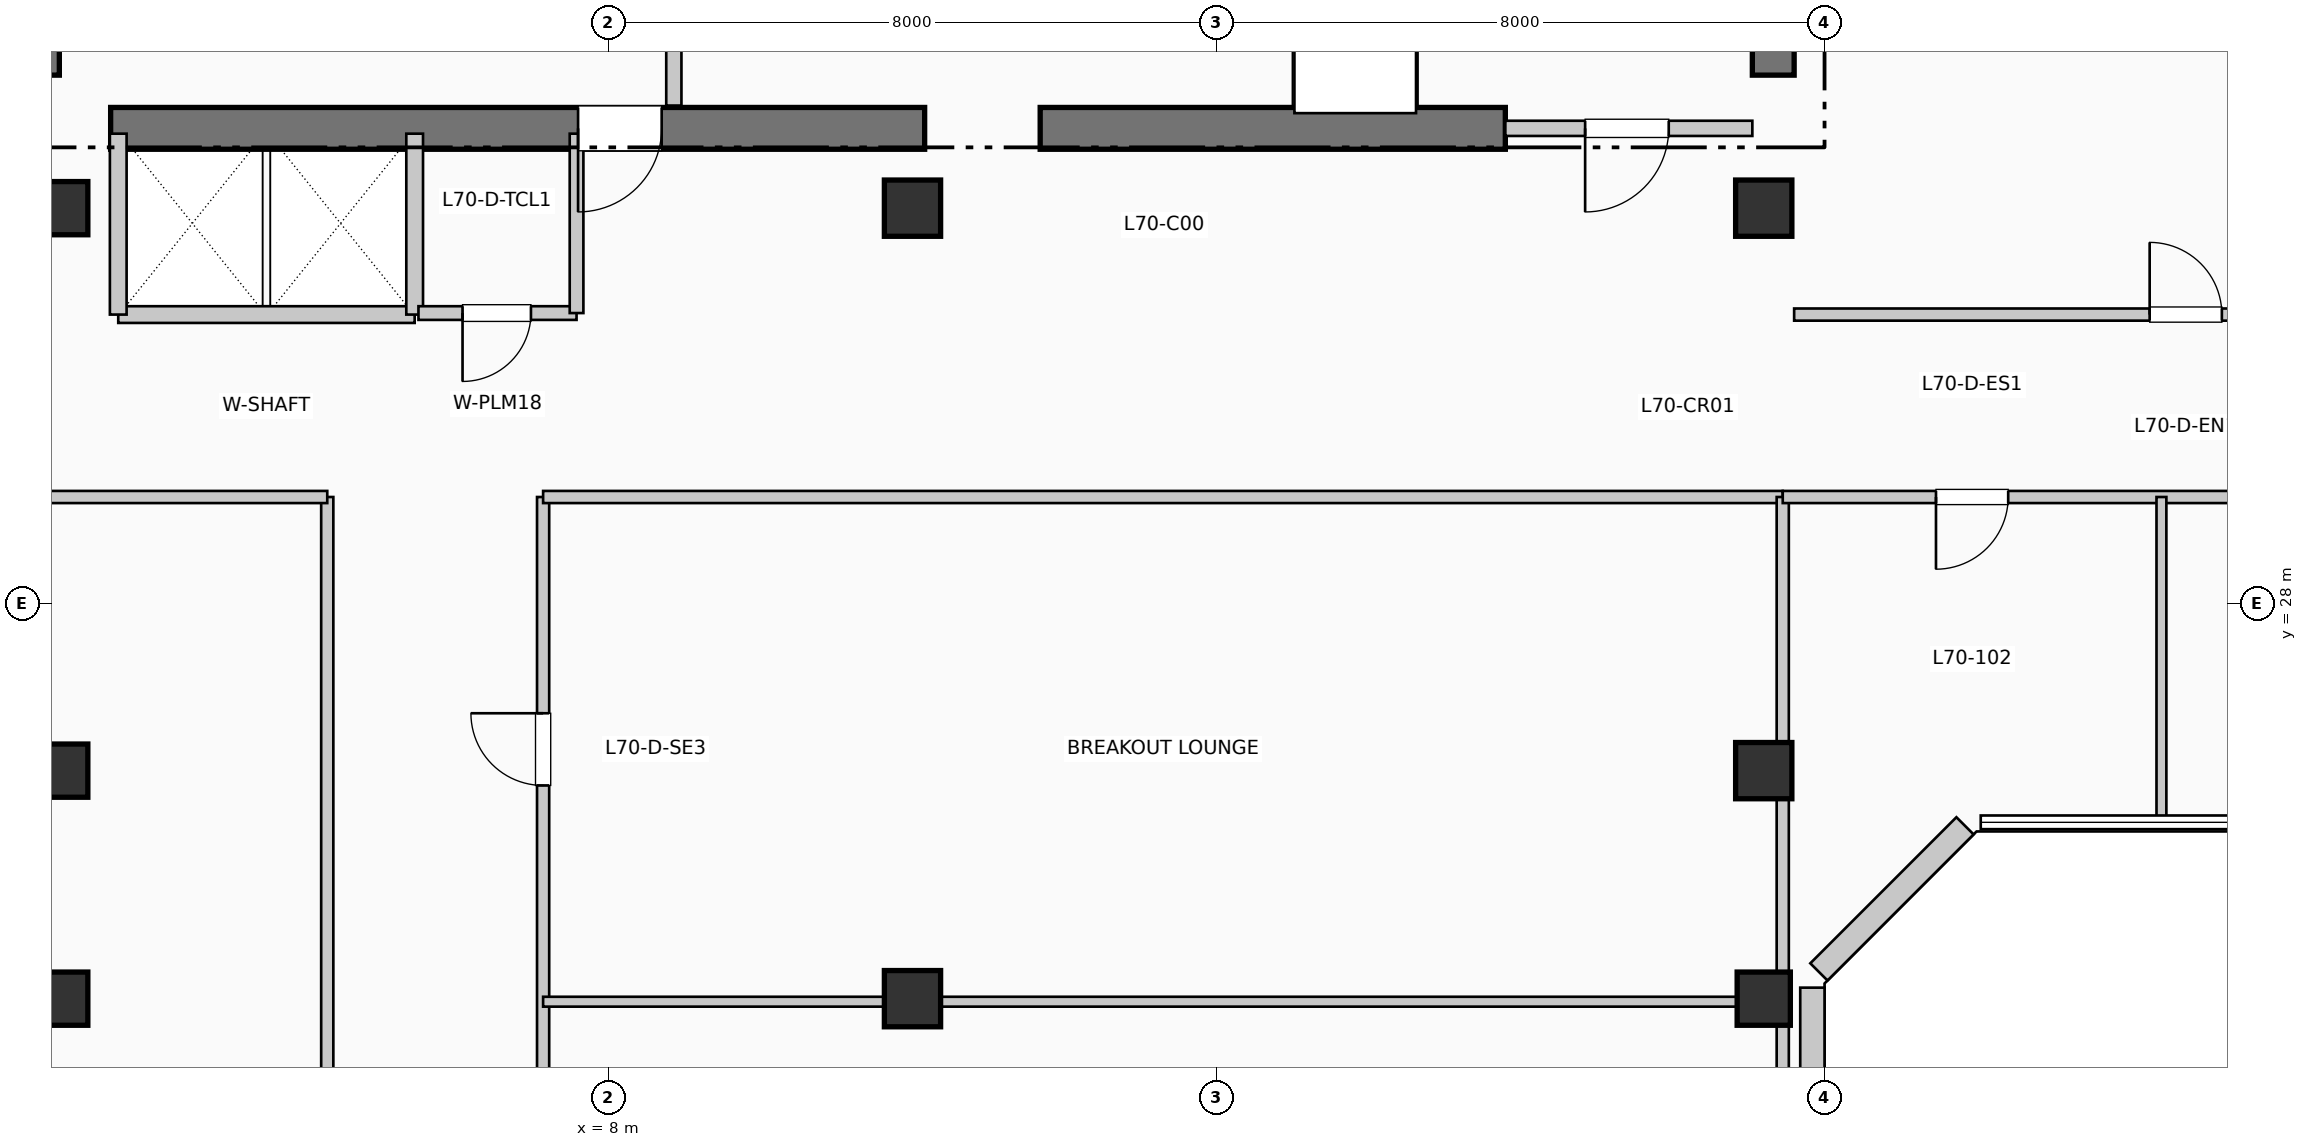
"""IFC4 building model, lengths in metres.
Left out: names, types, materials, properties, quantities, classifications, styles, units other than length and angle.
Written with IfcOpenShell. Run it as: python <this file> out.ifc"""

import sys

from ifc_helpers import new_model, si_unit, direction, frame, frame_2d, origin, origin_2d, place, context, subcontext, project, spatial, rectangle, extrude, element, fill, save


model = new_model("IFC4")
c1 = context("Model", 3, precision=1e-05, world=origin(), true_north=direction((0.0, 1.0)))
c2 = subcontext(c1, "Body", "Model", "MODEL_VIEW")
j1 = project(units=[si_unit("LENGTHUNIT", "METRE"), si_unit("PLANEANGLEUNIT", "RADIAN")], contexts=[c1])
p1 = place(None, origin())
s1 = spatial("IfcSite", under=j1, at=p1, CompositionType="ELEMENT")
p2 = place(p1, origin())
s2 = spatial("IfcBuilding", under=s1, at=p2, CompositionType="ELEMENT")
p3 = place(p2, frame((0.0, 0.0, 288.09)))
s3 = spatial("IfcBuildingStorey", under=s2, at=p3, CompositionType="ELEMENT", Elevation=288.09)
p4 = place(p3, frame((0.5, 34.95, 0.0), z_axis=(0.0, 0.0, 1.0), x_axis=(0.0, 1.0, 0.0)))
e1 = element("IfcWall", 1, at=p4, inside=s3, PredefinedType="SHEAR", context=c2, shape_type="SweptSolid", body=[
    extrude(rectangle(XDim=7.9, YDim=0.55, at=frame_2d((3.95, 0.0))), origin(), (0.0, 0.0, 1.0), 3.96),
])
p5 = place(p3, frame((23.325, 34.95, 0.0), z_axis=(0.0, 0.0, 1.0), x_axis=(0.0, 1.0, 0.0)))
e2 = element("IfcWall", 2, at=p5, inside=s3, PredefinedType="SHEAR", context=c2, shape_type="SweptSolid", body=[
    extrude(rectangle(XDim=10.64, YDim=0.55, at=frame_2d((5.32, 0.0))), origin(), (0.0, 0.0, 1.0), 3.96),
])
p6 = place(p3, frame((1.45, 34.25, 0.0), z_axis=(0.0, 0.0, 1.0), x_axis=(1.0, 0.0, 0.0)))
e3 = element("IfcWall", 3, at=p6, inside=s3, PredefinedType="SHEAR", context=c2, shape_type="SweptSolid", body=[
    extrude(rectangle(XDim=10.71, YDim=0.55, at=frame_2d((5.355, 0.0))), origin(), (0.0, 0.0, 1.0), 3.96),
])
p7 = place(p6, frame((7.25, 0.0, 0.0), z_axis=(0.0, 0.0, 1.0), x_axis=(-1.0, 0.0, 0.0)))
e4 = element("IfcOpeningElement", 4, at=p7, cuts=e3, PredefinedType="OPENING", context=c2, shape_type="SweptSolid", body=[
    extrude(rectangle(XDim=1.1, YDim=2.15, at=frame_2d((0.55, 1.075))), frame((0.0, 0.285, 0.0), z_axis=(0.0, -1.0, 0.0), x_axis=(1.0, 0.0, 0.0)), (0.0, 0.0, 1.0), 0.57),
])
p8 = place(p3, frame((13.68, 34.25, 0.0), z_axis=(0.0, 0.0, 1.0), x_axis=(1.0, 0.0, 0.0)))
e5 = element("IfcWall", 5, at=p8, inside=s3, PredefinedType="SHEAR", context=c2, shape_type="SweptSolid", body=[
    extrude(rectangle(XDim=6.12, YDim=0.55, at=frame_2d((3.06, 0.0))), origin(), (0.0, 0.0, 1.0), 3.96),
])
for number, where, z_axis, x_axis in (
    (6, (0.8, 22.8, 0.0), (0.0, 0.0, 1.0), (1.0, 0.0, 0.0)),
    (7, (0.8, 25.8, 0.0), (0.0, 0.0, 1.0), (1.0, 0.0, 0.0)),
    (8, (0.8, 33.2, 0.0), (0.0, 0.0, 1.0), (1.0, 0.0, 0.0)),
):
    element("IfcColumn", number, at=place(p3, frame(where, z_axis=z_axis, x_axis=x_axis)), inside=s3, PredefinedType="COLUMN", context=c2, shape_type="SweptSolid", body=[
        extrude(rectangle(XDim=0.7, YDim=0.7, at=origin_2d()), origin(), (0.0, 0.0, 1.0), 3.96),
    ])
for number, where, z_axis, x_axis in (
    (9, (12.0, 22.8, 0.0), (0.0, 0.0, 1.0), (1.0, 0.0, 0.0)),
    (10, (12.0, 33.2, 0.0), (0.0, 0.0, 1.0), (1.0, 0.0, 0.0)),
):
    element("IfcColumn", number, at=place(p3, frame(where, z_axis=z_axis, x_axis=x_axis)), inside=s3, PredefinedType="COLUMN", context=c2, shape_type="SweptSolid", body=[
        extrude(rectangle(XDim=0.74, YDim=0.74, at=origin_2d()), origin(), (0.0, 0.0, 1.0), 3.96),
    ])
p9 = place(p3, frame((23.2, 22.8, 0.0), z_axis=(0.0, 0.0, 1.0), x_axis=(1.0, 0.0, 0.0)))
e11 = element("IfcColumn", 11, at=p9, inside=s3, PredefinedType="COLUMN", context=c2, shape_type="SweptSolid", body=[
    extrude(rectangle(XDim=0.7, YDim=0.7, at=origin_2d()), origin(), (0.0, 0.0, 1.0), 3.96),
])
for number, where, z_axis, x_axis in (
    (12, (23.2, 25.8, 0.0), (0.0, 0.0, 1.0), (1.0, 0.0, 0.0)),
    (13, (23.2, 33.2, 0.0), (0.0, 0.0, 1.0), (1.0, 0.0, 0.0)),
):
    element("IfcColumn", number, at=place(p3, frame(where, z_axis=z_axis, x_axis=x_axis)), inside=s3, PredefinedType="COLUMN", context=c2, shape_type="SweptSolid", body=[
        extrude(rectangle(XDim=0.74, YDim=0.74, at=origin_2d()), origin(), (0.0, 0.0, 1.0), 3.96),
    ])
p10 = place(p3, frame((23.84, 8.855, 0.0), z_axis=(0.0, 0.0, 1.0), x_axis=(0.0, 1.0, 0.0)))
e14 = element("IfcWall", 14, at=p10, inside=s3, PredefinedType="SOLIDWALL", context=c2, shape_type="SweptSolid", body=[
    extrude(rectangle(XDim=14.09, YDim=0.32, at=frame_2d((7.045, 0.0))), origin(), (0.0, 0.0, 1.0), 3.74),
])
p11 = place(p3, frame((23.926, 23.152, 0.0), z_axis=(0.0, 0.0, 1.0), x_axis=(0.707106781187, 0.707106781187, 0.0)))
e15 = element("IfcWall", 15, at=p11, inside=s3, PredefinedType="SOLIDWALL", context=c2, shape_type="SweptSolid", body=[
    extrude(rectangle(XDim=2.718, YDim=0.32, at=frame_2d((1.359, 0.0))), origin(), (0.0, 0.0, 1.0), 3.74),
])
p12 = place(p3, frame((8.86, 34.55, 0.0), z_axis=(0.0, 0.0, 1.0), x_axis=(0.0, 1.0, 0.0)))
e16 = element("IfcWall", 16, at=p12, inside=s3, PredefinedType="PARTITIONING", context=c2, shape_type="SweptSolid", body=[
    extrude(rectangle(XDim=2.5, YDim=0.2, at=frame_2d((1.25, 0.0))), origin(), (0.0, 0.0, 1.0), 3.74),
])
p13 = place(p3, frame((19.8, 34.25, 0.0), z_axis=(0.0, 0.0, 1.0), x_axis=(1.0, 0.0, 0.0)))
e17 = element("IfcWall", 17, at=p13, inside=s3, PredefinedType="PARTITIONING", context=c2, shape_type="SweptSolid", body=[
    extrude(rectangle(XDim=3.25, YDim=0.2, at=frame_2d((1.625, 0.0))), origin(), (0.0, 0.0, 1.0), 3.74),
])
p14 = place(p13, frame((2.15, 0.0, 0.0), z_axis=(0.0, 0.0, 1.0), x_axis=(-1.0, 0.0, 0.0)))
e18 = element("IfcOpeningElement", 18, at=p14, cuts=e17, PredefinedType="OPENING", context=c2, shape_type="SweptSolid", body=[
    extrude(rectangle(XDim=1.1, YDim=2.15, at=frame_2d((0.55, 1.075))), frame((0.0, 0.11, 0.0), z_axis=(0.0, -1.0, 0.0), x_axis=(1.0, 0.0, 0.0)), (0.0, 0.0, 1.0), 0.22),
])
p15 = place(p3, frame((1.55, 31.8, 0.0), z_axis=(0.0, 0.0, 1.0), x_axis=(1.0, 0.0, 0.0)))
e19 = element("IfcWall", 19, at=p15, inside=s3, PredefinedType="PARTITIONING", context=c2, shape_type="SweptSolid", body=[
    extrude(rectangle(XDim=3.9, YDim=0.22, at=frame_2d((1.95, 0.0))), origin(), (0.0, 0.0, 1.0), 3.74),
])
for number, where, z_axis, x_axis in (
    (20, (1.55, 31.8, 0.0), (0.0, 0.0, 1.0), (0.0, 1.0, 0.0)),
    (21, (5.45, 31.8, 0.0), (0.0, 0.0, 1.0), (0.0, 1.0, 0.0)),
):
    element("IfcWall", number, at=place(p3, frame(where, z_axis=z_axis, x_axis=x_axis)), inside=s3, PredefinedType="PARTITIONING", context=c2, shape_type="SweptSolid", body=[
        extrude(rectangle(XDim=2.38, YDim=0.22, at=frame_2d((1.19, 0.0))), origin(), (0.0, 0.0, 1.0), 3.74),
    ])
p16 = place(p3, frame((5.5, 31.82, 0.0), z_axis=(0.0, 0.0, 1.0), x_axis=(1.0, 0.0, 0.0)))
e22 = element("IfcWall", 22, at=p16, inside=s3, PredefinedType="PLUMBINGWALL", context=c2, shape_type="SweptSolid", body=[
    extrude(rectangle(XDim=2.08, YDim=0.18, at=frame_2d((1.04, 0.0))), origin(), (0.0, 0.0, 1.0), 3.74),
])
p17 = place(p16, frame((1.48, 0.0, 0.0), z_axis=(0.0, 0.0, 1.0), x_axis=(-1.0, 0.0, 0.0)))
e23 = element("IfcOpeningElement", 23, at=p17, cuts=e22, PredefinedType="OPENING", context=c2, shape_type="SweptSolid", body=[
    extrude(rectangle(XDim=0.9, YDim=2.1, at=frame_2d((0.45, 1.05))), frame((0.0, 0.1, 0.0), z_axis=(0.0, -1.0, 0.0), x_axis=(1.0, 0.0, 0.0)), (0.0, 0.0, 1.0), 0.2),
])
p18 = place(p3, frame((7.58, 31.82, 0.0), z_axis=(0.0, 0.0, 1.0), x_axis=(0.0, 1.0, 0.0)))
e24 = element("IfcWall", 24, at=p18, inside=s3, PredefinedType="PLUMBINGWALL", context=c2, shape_type="SweptSolid", body=[
    extrude(rectangle(XDim=2.36, YDim=0.18, at=frame_2d((1.18, 0.0))), origin(), (0.0, 0.0, 1.0), 3.74),
])
p19 = place(p3, frame((4.3, 12.8, 0.0), z_axis=(0.0, 0.0, 1.0), x_axis=(0.0, 1.0, 0.0)))
e25 = element("IfcWall", 25, at=p19, inside=s3, PredefinedType="PARTITIONING", context=c2, shape_type="SweptSolid", body=[
    extrude(rectangle(XDim=16.6, YDim=0.16, at=frame_2d((8.3, 0.0))), origin(), (0.0, 0.0, 1.0), 3.74),
])
p20 = place(p19, frame((8.775, 0.0, 0.0), z_axis=(0.0, 0.0, 1.0), x_axis=(-1.0, 0.0, 0.0)))
e26 = element("IfcOpeningElement", 26, at=p20, cuts=e25, PredefinedType="OPENING", context=c2, shape_type="SweptSolid", body=[
    extrude(rectangle(XDim=0.95, YDim=2.15, at=frame_2d((0.475, 1.075))), frame((0.0, 0.09, 0.0), z_axis=(0.0, -1.0, 0.0), x_axis=(1.0, 0.0, 0.0)), (0.0, 0.0, 1.0), 0.18),
])
p21 = place(p3, frame((7.14, 12.8, 0.0), z_axis=(0.0, 0.0, 1.0), x_axis=(0.0, 1.0, 0.0)))
e27 = element("IfcWall", 27, at=p21, inside=s3, PredefinedType="PARTITIONING", context=c2, shape_type="SweptSolid", body=[
    extrude(rectangle(XDim=16.6, YDim=0.16, at=frame_2d((8.3, 0.0))), origin(), (0.0, 0.0, 1.0), 3.74),
])
p22 = place(p21, frame((1.849, 0.0, 0.0)))
e28 = element("IfcOpeningElement", 28, at=p22, cuts=e27, PredefinedType="OPENING", context=c2, shape_type="SweptSolid", body=[
    extrude(rectangle(XDim=0.95, YDim=2.15, at=frame_2d((0.475, 1.075))), frame((0.0, 0.09, 0.0), z_axis=(0.0, -1.0, 0.0), x_axis=(1.0, 0.0, 0.0)), (0.0, 0.0, 1.0), 0.18),
])
p23 = place(p21, frame((6.829, 0.0, 0.0)))
e29 = element("IfcOpeningElement", 29, at=p23, cuts=e27, PredefinedType="OPENING", context=c2, shape_type="SweptSolid", body=[
    extrude(rectangle(XDim=0.95, YDim=2.15, at=frame_2d((0.475, 1.075))), frame((0.0, 0.09, 0.0), z_axis=(0.0, -1.0, 0.0), x_axis=(1.0, 0.0, 0.0)), (0.0, 0.0, 1.0), 0.18),
])
p24 = place(p21, frame((12.805, 0.0, 0.0)))
e30 = element("IfcOpeningElement", 30, at=p24, cuts=e27, PredefinedType="OPENING", context=c2, shape_type="SweptSolid", body=[
    extrude(rectangle(XDim=0.95, YDim=2.15, at=frame_2d((0.475, 1.075))), frame((0.0, 0.09, 0.0), z_axis=(0.0, -1.0, 0.0), x_axis=(1.0, 0.0, 0.0)), (0.0, 0.0, 1.0), 0.18),
])
p25 = place(p3, frame((0.19, 29.4, 0.0), z_axis=(0.0, 0.0, 1.0), x_axis=(1.0, 0.0, 0.0)))
e31 = element("IfcWall", 31, at=p25, inside=s3, PredefinedType="PARTITIONING", context=c2, shape_type="SweptSolid", body=[
    extrude(rectangle(XDim=4.11, YDim=0.16, at=frame_2d((2.055, 0.0))), origin(), (0.0, 0.0, 1.0), 3.425),
])
p26 = place(p3, frame((7.14, 29.4, 0.0), z_axis=(0.0, 0.0, 1.0), x_axis=(1.0, 0.0, 0.0)))
e32 = element("IfcWall", 32, at=p26, inside=s3, PredefinedType="PARTITIONING", context=c2, shape_type="SweptSolid", body=[
    extrude(rectangle(XDim=16.31, YDim=0.16, at=frame_2d((8.155, 0.0))), origin(), (0.0, 0.0, 1.0), 3.425),
])
p27 = place(p3, frame((23.45, 5.99, 0.0), z_axis=(0.0, 0.0, 1.0), x_axis=(0.0, 1.0, 0.0)))
e33 = element("IfcWall", 33, at=p27, inside=s3, PredefinedType="PARTITIONING", context=c2, shape_type="SweptSolid", body=[
    extrude(rectangle(XDim=23.41, YDim=0.16, at=frame_2d((11.705, 0.0))), origin(), (0.0, 0.0, 1.0), 3.175),
])
p28 = place(p3, frame((7.14, 22.76, 0.0), z_axis=(0.0, 0.0, 1.0), x_axis=(1.0, 0.0, 0.0)))
e34 = element("IfcWall", 34, at=p28, inside=s3, PredefinedType="PARTITIONING", context=c2, shape_type="SweptSolid", body=[
    extrude(rectangle(XDim=16.31, YDim=0.13, at=frame_2d((8.155, 0.0))), origin(), (0.0, 0.0, 1.0), 3.175),
])
p29 = place(p3, frame((23.45, 29.4, 0.0), z_axis=(0.0, 0.0, 1.0), x_axis=(1.0, 0.0, 0.0)))
e35 = element("IfcWall", 35, at=p29, inside=s3, PredefinedType="PARTITIONING", context=c2, shape_type="SweptSolid", body=[
    extrude(rectangle(XDim=20.76, YDim=0.16, at=frame_2d((10.38, 0.0))), origin(), (0.0, 0.0, 1.0), 3.425),
])
p30 = place(p29, frame((2.966, 0.0, 0.0), z_axis=(0.0, 0.0, 1.0), x_axis=(-1.0, 0.0, 0.0)))
e36 = element("IfcOpeningElement", 36, at=p30, cuts=e35, PredefinedType="OPENING", context=c2, shape_type="SweptSolid", body=[
    extrude(rectangle(XDim=0.95, YDim=2.15, at=frame_2d((0.475, 1.075))), frame((0.0, 0.09, 0.0), z_axis=(0.0, -1.0, 0.0), x_axis=(1.0, 0.0, 0.0)), (0.0, 0.0, 1.0), 0.18),
])
p31 = place(p29, frame((8.364, 0.0, 0.0), z_axis=(0.0, 0.0, 1.0), x_axis=(-1.0, 0.0, 0.0)))
e37 = element("IfcOpeningElement", 37, at=p31, cuts=e35, PredefinedType="OPENING", context=c2, shape_type="SweptSolid", body=[
    extrude(rectangle(XDim=0.95, YDim=2.15, at=frame_2d((0.475, 1.075))), frame((0.0, 0.09, 0.0), z_axis=(0.0, -1.0, 0.0), x_axis=(1.0, 0.0, 0.0)), (0.0, 0.0, 1.0), 0.18),
])
p32 = place(p29, frame((14.177, 0.0, 0.0), z_axis=(0.0, 0.0, 1.0), x_axis=(-1.0, 0.0, 0.0)))
e38 = element("IfcOpeningElement", 38, at=p32, cuts=e35, PredefinedType="OPENING", context=c2, shape_type="SweptSolid", body=[
    extrude(rectangle(XDim=0.95, YDim=2.15, at=frame_2d((0.475, 1.075))), frame((0.0, 0.09, 0.0), z_axis=(0.0, -1.0, 0.0), x_axis=(1.0, 0.0, 0.0)), (0.0, 0.0, 1.0), 0.18),
])
p33 = place(p29, frame((19.159, 0.0, 0.0), z_axis=(0.0, 0.0, 1.0), x_axis=(-1.0, 0.0, 0.0)))
e39 = element("IfcOpeningElement", 39, at=p33, cuts=e35, PredefinedType="OPENING", context=c2, shape_type="SweptSolid", body=[
    extrude(rectangle(XDim=0.95, YDim=2.15, at=frame_2d((0.475, 1.075))), frame((0.0, 0.09, 0.0), z_axis=(0.0, -1.0, 0.0), x_axis=(1.0, 0.0, 0.0)), (0.0, 0.0, 1.0), 0.18),
])
p34 = place(p3, frame((23.6, 31.8, 0.0), z_axis=(0.0, 0.0, 1.0), x_axis=(1.0, 0.0, 0.0)))
e40 = element("IfcWall", 40, at=p34, inside=s3, PredefinedType="PARTITIONING", context=c2, shape_type="SweptSolid", body=[
    extrude(rectangle(XDim=20.61, YDim=0.16, at=frame_2d((10.305, 0.0))), origin(), (0.0, 0.0, 1.0), 3.74),
])
p35 = place(p34, frame((4.677, 0.0, 0.0)))
e41 = element("IfcOpeningElement", 41, at=p35, cuts=e40, PredefinedType="OPENING", context=c2, shape_type="SweptSolid", body=[
    extrude(rectangle(XDim=0.95, YDim=2.15, at=frame_2d((0.475, 1.075))), frame((0.0, 0.09, 0.0), z_axis=(0.0, -1.0, 0.0), x_axis=(1.0, 0.0, 0.0)), (0.0, 0.0, 1.0), 0.18),
])
p36 = place(p34, frame((14.982, 0.0, 0.0)))
e42 = element("IfcOpeningElement", 42, at=p36, cuts=e40, PredefinedType="OPENING", context=c2, shape_type="SweptSolid", body=[
    extrude(rectangle(XDim=0.95, YDim=2.15, at=frame_2d((0.475, 1.075))), frame((0.0, 0.09, 0.0), z_axis=(0.0, -1.0, 0.0), x_axis=(1.0, 0.0, 0.0)), (0.0, 0.0, 1.0), 0.18),
])
p37 = place(p3, frame((28.432, 25.19, 0.0), z_axis=(0.0, 0.0, 1.0), x_axis=(0.0, 1.0, 0.0)))
e43 = element("IfcWall", 43, at=p37, inside=s3, PredefinedType="PARTITIONING", context=c2, shape_type="SweptSolid", body=[
    extrude(rectangle(XDim=4.21, YDim=0.13, at=frame_2d((2.105, 0.0))), origin(), (0.0, 0.0, 1.0), 3.74),
])
p38 = place(p7, origin())
e44 = element("IfcDoor", 44, at=p38, inside=s3, OperationType="SINGLE_SWING_LEFT", PredefinedType="DOOR", context=c2, shape_type="SweptSolid", body=[
    extrude(rectangle(XDim=1.1, YDim=2.15, at=frame_2d((0.55, 1.075))), frame((0.0, 0.025, 0.0), z_axis=(0.0, -1.0, 0.0), x_axis=(1.0, 0.0, 0.0)), (0.0, 0.0, 1.0), 0.05),
])
fill(e4, e44)
p39 = place(p14, origin())
e45 = element("IfcDoor", 45, at=p39, inside=s3, OperationType="SINGLE_SWING_LEFT", PredefinedType="DOOR", context=c2, shape_type="SweptSolid", body=[
    extrude(rectangle(XDim=1.1, YDim=2.15, at=frame_2d((0.55, 1.075))), frame((0.0, 0.025, 0.0), z_axis=(0.0, -1.0, 0.0), x_axis=(1.0, 0.0, 0.0)), (0.0, 0.0, 1.0), 0.05),
])
fill(e18, e45)
p40 = place(p17, origin())
e46 = element("IfcDoor", 46, at=p40, inside=s3, OperationType="SINGLE_SWING_LEFT", PredefinedType="DOOR", context=c2, shape_type="SweptSolid", body=[
    extrude(rectangle(XDim=0.9, YDim=2.1, at=frame_2d((0.45, 1.05))), frame((0.0, 0.025, 0.0), z_axis=(0.0, -1.0, 0.0), x_axis=(1.0, 0.0, 0.0)), (0.0, 0.0, 1.0), 0.05),
])
fill(e23, e46)
p41 = place(p24, origin())
e47 = element("IfcDoor", 47, at=p41, inside=s3, OperationType="SINGLE_SWING_RIGHT", PredefinedType="DOOR", context=c2, shape_type="SweptSolid", body=[
    extrude(rectangle(XDim=0.95, YDim=2.15, at=frame_2d((0.475, 1.075))), frame((0.0, 0.025, 0.0), z_axis=(0.0, -1.0, 0.0), x_axis=(1.0, 0.0, 0.0)), (0.0, 0.0, 1.0), 0.05),
])
fill(e30, e47)
p42 = place(p30, origin())
e48 = element("IfcDoor", 48, at=p42, inside=s3, OperationType="SINGLE_SWING_LEFT", PredefinedType="DOOR", context=c2, shape_type="SweptSolid", body=[
    extrude(rectangle(XDim=0.95, YDim=2.15, at=frame_2d((0.475, 1.075))), frame((0.0, 0.025, 0.0), z_axis=(0.0, -1.0, 0.0), x_axis=(1.0, 0.0, 0.0)), (0.0, 0.0, 1.0), 0.05),
])
fill(e36, e48)
p43 = place(p35, origin())
e49 = element("IfcDoor", 49, at=p43, inside=s3, OperationType="SINGLE_SWING_LEFT", PredefinedType="DOOR", context=c2, shape_type="SweptSolid", body=[
    extrude(rectangle(XDim=0.95, YDim=2.15, at=frame_2d((0.475, 1.075))), frame((0.0, 0.025, 0.0), z_axis=(0.0, -1.0, 0.0), x_axis=(1.0, 0.0, 0.0)), (0.0, 0.0, 1.0), 0.05),
])
fill(e41, e49)
save(model, sys.argv[1])
